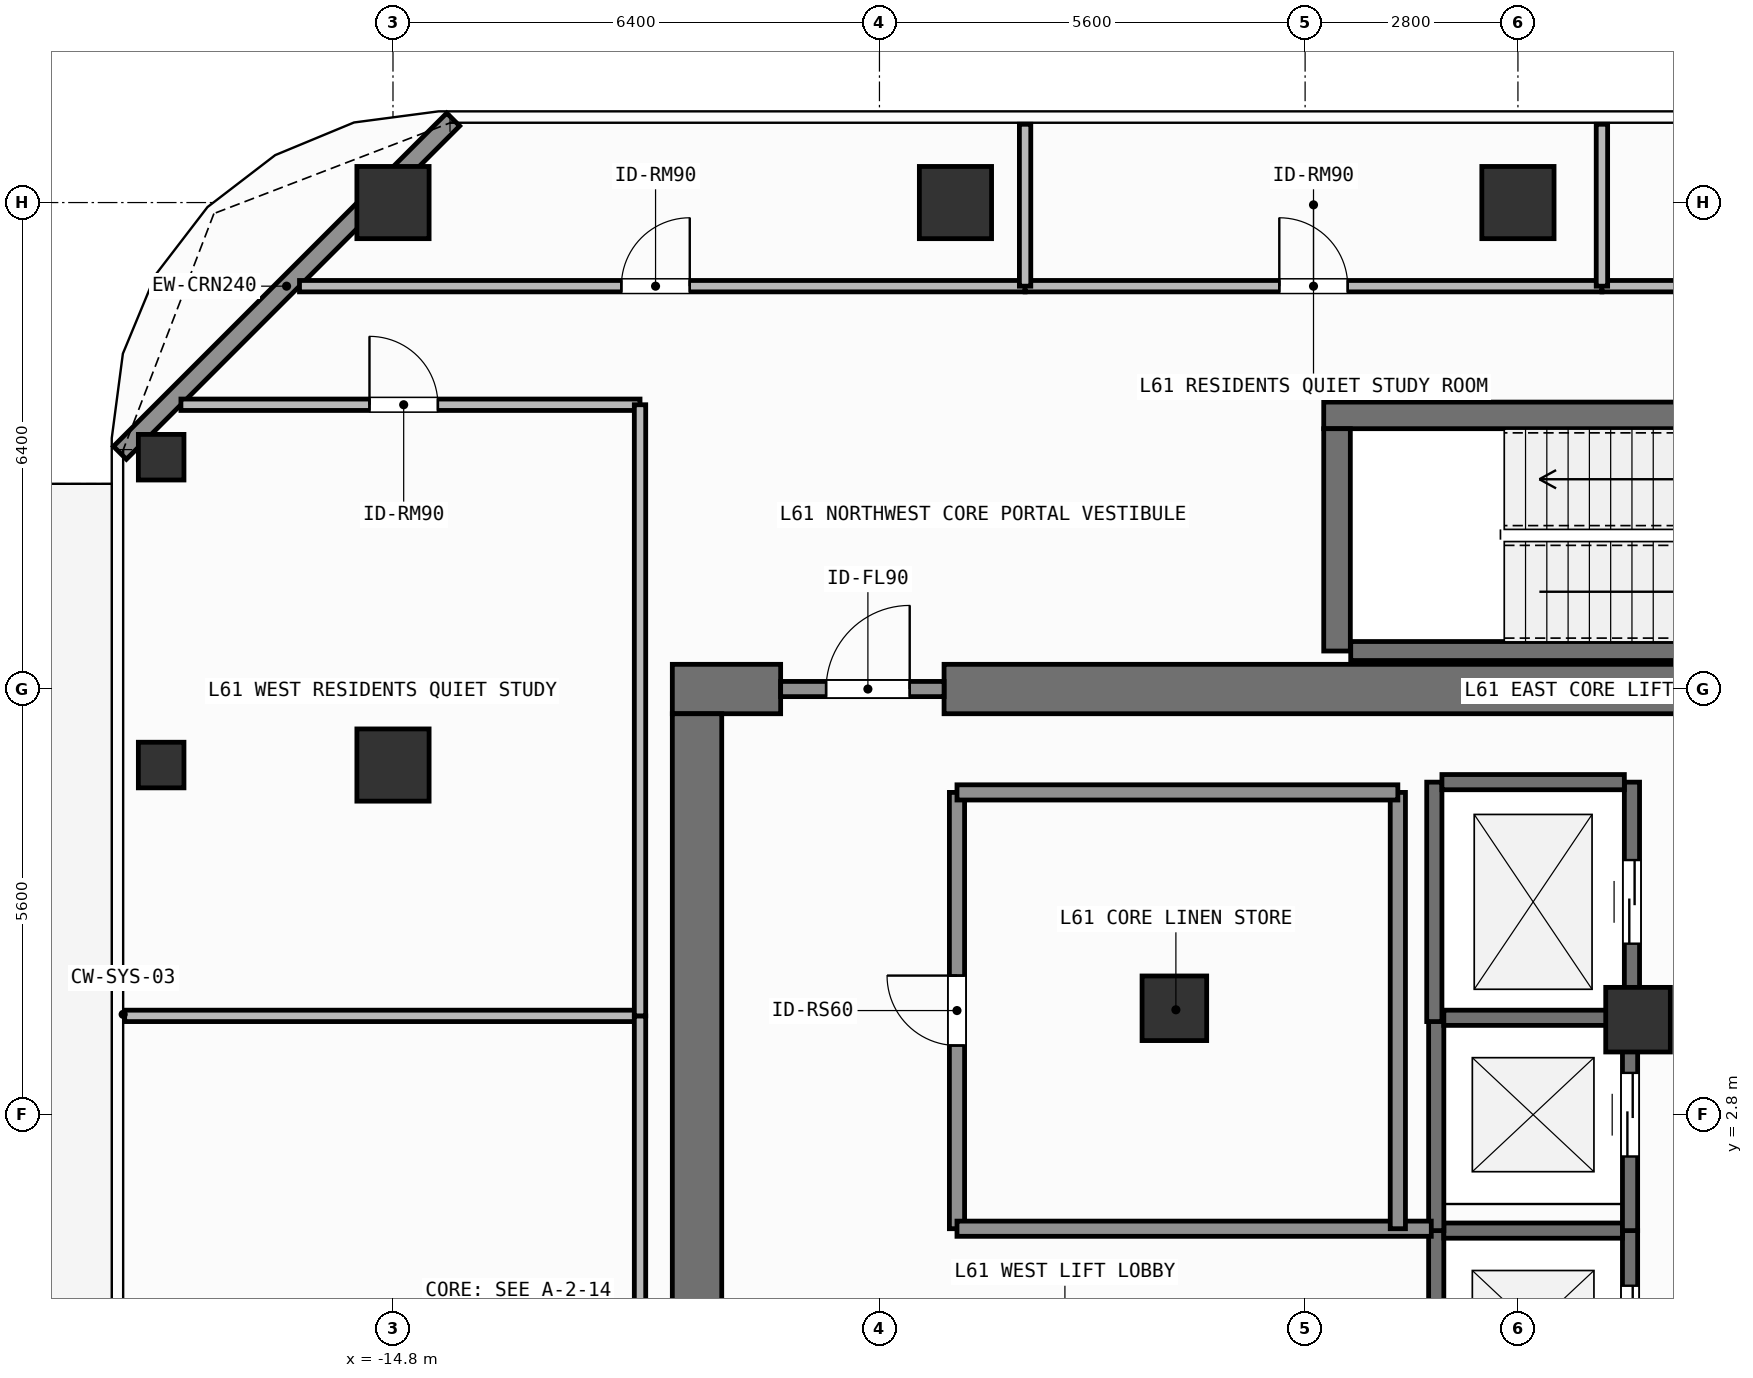
"""IFC4 building model, lengths in metres.
Left out: names, types, materials, properties, quantities, classifications, styles, units other than length and angle.
Written with IfcOpenShell. Run it as: python <this file> out.ifc"""

import sys

from ifc_helpers import new_model, si_unit, direction, frame, frame_2d, origin, origin_2d, place, context, subcontext, project, spatial, rectangle, hollow_rectangle, extrude, element, fill, save


model = new_model("IFC4")
c1 = context("Model", 3, precision=1e-05, world=origin(), true_north=direction((0.0, 1.0)))
c2 = subcontext(c1, "Body", "Model", "MODEL_VIEW")
j1 = project(units=[si_unit("LENGTHUNIT", "METRE"), si_unit("PLANEANGLEUNIT", "RADIAN")], contexts=[c1])
p1 = place(None, origin())
s1 = spatial("IfcSite", under=j1, at=p1, CompositionType="ELEMENT")
p2 = place(p1, origin())
s2 = spatial("IfcBuilding", under=s1, at=p2, CompositionType="ELEMENT")
p3 = place(p2, frame((0.0, 0.0, 250.8)))
s3 = spatial("IfcBuildingStorey", under=s2, at=p3, CompositionType="ELEMENT", Elevation=250.8)
p4 = place(p3, frame((-11.125, 8.4, 0.0), z_axis=(0.0, 0.0, 1.0), x_axis=(1.0, 0.0, 0.0)))
e1 = element("IfcWall", 1, at=p4, inside=s3, PredefinedType="SHEAR", context=c2, shape_type="SweptSolid", body=[
    extrude(rectangle(XDim=1.425, YDim=0.65, at=frame_2d((0.712, 0.0))), origin(), (0.0, 0.0, 1.0), 3.9),
])
p5 = place(p3, frame((-7.55, 8.4, 0.0), z_axis=(0.0, 0.0, 1.0), x_axis=(1.0, 0.0, 0.0)))
e2 = element("IfcWall", 2, at=p5, inside=s3, PredefinedType="SHEAR", context=c2, shape_type="SweptSolid", body=[
    extrude(rectangle(XDim=16.275, YDim=0.65, at=frame_2d((8.138, 0.0))), origin(), (0.0, 0.0, 1.0), 3.9),
])
p6 = place(p3, frame((-10.8, -8.075, 0.0), z_axis=(0.0, 0.0, 1.0), x_axis=(0.0, 1.0, 0.0)))
e3 = element("IfcWall", 3, at=p6, inside=s3, PredefinedType="SHEAR", context=c2, shape_type="SweptSolid", body=[
    extrude(rectangle(XDim=16.15, YDim=0.65, at=frame_2d((8.075, 0.0))), origin(), (0.0, 0.0, 1.0), 3.9),
])
p7 = place(p3, frame((-2.555, 12.0, 0.0), z_axis=(0.0, 0.0, 1.0), x_axis=(1.0, 0.0, 0.0)))
e4 = element("IfcWall", 4, at=p7, inside=s3, PredefinedType="SHEAR", context=c2, shape_type="SweptSolid", body=[
    extrude(rectangle(XDim=7.31, YDim=0.35, at=frame_2d((3.655, 0.0))), origin(), (0.0, 0.0, 1.0), 3.9),
])
p8 = place(p3, frame((-2.2, 8.9, 0.0), z_axis=(0.0, 0.0, 1.0), x_axis=(1.0, 0.0, 0.0)))
e5 = element("IfcWall", 5, at=p8, inside=s3, PredefinedType="SHEAR", context=c2, shape_type="SweptSolid", body=[
    extrude(rectangle(XDim=6.6, YDim=0.25, at=frame_2d((3.3, 0.0))), origin(), (0.0, 0.0, 1.0), 3.9),
])
p9 = place(p3, frame((-2.38, 8.9, 0.0), z_axis=(0.0, 0.0, 1.0), x_axis=(0.0, 1.0, 0.0)))
e6 = element("IfcWall", 6, at=p9, inside=s3, PredefinedType="SHEAR", context=c2, shape_type="SweptSolid", body=[
    extrude(rectangle(XDim=2.925, YDim=0.35, at=frame_2d((1.462, 0.0))), origin(), (0.0, 0.0, 1.0), 3.9),
])
for number, where, z_axis, x_axis in (
    (7, (-14.8, 14.8, 0.0), (0.0, 0.0, 1.0), (1.0, 0.0, 0.0)),
    (8, (-7.4, 14.8, 0.0), (0.0, 0.0, 1.0), (1.0, 0.0, 0.0)),
    (9, (0.0, 14.8, 0.0), (0.0, 0.0, 1.0), (1.0, 0.0, 0.0)),
    (10, (-14.8, 7.4, 0.0), (0.0, 0.0, 1.0), (1.0, 0.0, 0.0)),
):
    element("IfcColumn", number, at=place(p3, frame(where, z_axis=z_axis, x_axis=x_axis)), inside=s3, PredefinedType="COLUMN", context=c2, shape_type="SweptSolid", body=[
        extrude(rectangle(XDim=0.95, YDim=0.95, at=origin_2d()), origin(), (0.0, 0.0, 1.0), 3.9),
    ])
for number, where, z_axis, x_axis in (
    (11, (1.58, 4.05, 0.0), (0.0, 0.0, 1.0), (1.0, 0.0, 0.0)),
    (12, (-4.52, 4.2, 0.0), (0.0, 0.0, 1.0), (1.0, 0.0, 0.0)),
):
    element("IfcColumn", number, at=place(p3, frame(where, z_axis=z_axis, x_axis=x_axis)), inside=s3, PredefinedType="COLUMN", context=c2, shape_type="SweptSolid", body=[
        extrude(rectangle(XDim=0.85, YDim=0.85, at=origin_2d()), origin(), (0.0, 0.0, 1.0), 3.9),
    ])
for number, where, z_axis, x_axis in (
    (13, (-17.85, 11.45, 0.0), (0.0, 0.0, 1.0), (1.0, 0.0, 0.0)),
    (14, (-17.85, 7.4, 0.0), (0.0, 0.0, 1.0), (1.0, 0.0, 0.0)),
):
    element("IfcColumn", number, at=place(p3, frame(where, z_axis=z_axis, x_axis=x_axis)), inside=s3, PredefinedType="COLUMN", context=c2, shape_type="SweptSolid", body=[
        extrude(hollow_rectangle(XDim=0.6, YDim=0.6, WallThickness=0.028, at=origin_2d()), origin(), (0.0, 0.0, 1.0), 3.9),
    ])
p10 = place(p3, frame((-18.392, 11.508, 0.0), z_axis=(0.0, 0.0, 1.0), x_axis=(0.707106781187, 0.707106781187, 0.0)))
e15 = element("IfcWall", 15, at=p10, inside=s3, PredefinedType="SOLIDWALL", context=c2, shape_type="SweptSolid", body=[
    extrude(rectangle(XDim=6.201, YDim=0.24, at=frame_2d((3.101, 0.0))), origin(), (0.0, 0.0, 1.0), 3.62),
])
p11 = place(p3, frame((-1.075, -1.525, 0.0), z_axis=(0.0, 0.0, 1.0), x_axis=(0.0, 1.0, 0.0)))
e16 = element("IfcWall", 16, at=p11, inside=s3, PredefinedType="SHEAR", context=c2, shape_type="SweptSolid", body=[
    extrude(rectangle(XDim=2.8, YDim=0.2, at=frame_2d((1.4, 0.0))), origin(), (0.0, 0.0, 1.0), 3.62),
])
p12 = place(p3, frame((1.475, -1.525, 0.0), z_axis=(0.0, 0.0, 1.0), x_axis=(0.0, 1.0, 0.0)))
e17 = element("IfcWall", 17, at=p12, inside=s3, PredefinedType="SHEAR", context=c2, shape_type="SweptSolid", body=[
    extrude(rectangle(XDim=2.8, YDim=0.2, at=frame_2d((1.4, 0.0))), origin(), (0.0, 0.0, 1.0), 3.62),
])
p13 = place(p12, frame((0.975, 0.0, 0.0)))
e18 = element("IfcOpeningElement", 18, at=p13, cuts=e17, PredefinedType="OPENING", context=c2, shape_type="SweptSolid", body=[
    extrude(rectangle(XDim=1.1, YDim=2.2, at=frame_2d((0.55, 1.1))), frame((0.0, 0.11, 0.0), z_axis=(0.0, -1.0, 0.0), x_axis=(1.0, 0.0, 0.0)), (0.0, 0.0, 1.0), 0.22),
])
p14 = place(p3, frame((-0.975, 1.275, 0.0), z_axis=(0.0, 0.0, 1.0), x_axis=(1.0, 0.0, 0.0)))
e19 = element("IfcWall", 19, at=p14, inside=s3, PredefinedType="SHEAR", context=c2, shape_type="SweptSolid", body=[
    extrude(rectangle(XDim=2.35, YDim=0.2, at=frame_2d((1.175, 0.0))), origin(), (0.0, 0.0, 1.0), 3.62),
])
p15 = place(p3, frame((-1.075, 1.275, 0.0), z_axis=(0.0, 0.0, 1.0), x_axis=(0.0, 1.0, 0.0)))
e20 = element("IfcWall", 20, at=p15, inside=s3, PredefinedType="SHEAR", context=c2, shape_type="SweptSolid", body=[
    extrude(rectangle(XDim=2.8, YDim=0.2, at=frame_2d((1.4, 0.0))), origin(), (0.0, 0.0, 1.0), 3.62),
])
p16 = place(p3, frame((1.475, 1.275, 0.0), z_axis=(0.0, 0.0, 1.0), x_axis=(0.0, 1.0, 0.0)))
e21 = element("IfcWall", 21, at=p16, inside=s3, PredefinedType="SHEAR", context=c2, shape_type="SweptSolid", body=[
    extrude(rectangle(XDim=2.8, YDim=0.2, at=frame_2d((1.4, 0.0))), origin(), (0.0, 0.0, 1.0), 3.62),
])
p17 = place(p16, frame((0.975, 0.0, 0.0)))
e22 = element("IfcOpeningElement", 22, at=p17, cuts=e21, PredefinedType="OPENING", context=c2, shape_type="SweptSolid", body=[
    extrude(rectangle(XDim=1.1, YDim=2.2, at=frame_2d((0.55, 1.1))), frame((0.0, 0.11, 0.0), z_axis=(0.0, -1.0, 0.0), x_axis=(1.0, 0.0, 0.0)), (0.0, 0.0, 1.0), 0.22),
])
p18 = place(p3, frame((-0.975, 4.075, 0.0), z_axis=(0.0, 0.0, 1.0), x_axis=(1.0, 0.0, 0.0)))
e23 = element("IfcWall", 23, at=p18, inside=s3, PredefinedType="SHEAR", context=c2, shape_type="SweptSolid", body=[
    extrude(rectangle(XDim=2.35, YDim=0.2, at=frame_2d((1.175, 0.0))), origin(), (0.0, 0.0, 1.0), 3.62),
])
p19 = place(p3, frame((-1.1, 4.025, 0.0), z_axis=(0.0, 0.0, 1.0), x_axis=(0.0, 1.0, 0.0)))
e24 = element("IfcWall", 24, at=p19, inside=s3, PredefinedType="SHEAR", context=c2, shape_type="SweptSolid", body=[
    extrude(rectangle(XDim=3.15, YDim=0.2, at=frame_2d((1.575, 0.0))), origin(), (0.0, 0.0, 1.0), 3.62),
])
p20 = place(p3, frame((1.5, 4.025, 0.0), z_axis=(0.0, 0.0, 1.0), x_axis=(0.0, 1.0, 0.0)))
e25 = element("IfcWall", 25, at=p20, inside=s3, PredefinedType="SHEAR", context=c2, shape_type="SweptSolid", body=[
    extrude(rectangle(XDim=3.15, YDim=0.2, at=frame_2d((1.575, 0.0))), origin(), (0.0, 0.0, 1.0), 3.62),
])
p21 = place(p20, frame((1.025, 0.0, 0.0)))
e26 = element("IfcOpeningElement", 26, at=p21, cuts=e25, PredefinedType="OPENING", context=c2, shape_type="SweptSolid", body=[
    extrude(rectangle(XDim=1.1, YDim=2.2, at=frame_2d((0.55, 1.1))), frame((0.0, 0.11, 0.0), z_axis=(0.0, -1.0, 0.0), x_axis=(1.0, 0.0, 0.0)), (0.0, 0.0, 1.0), 0.22),
])
p22 = place(p3, frame((-1.0, 7.175, 0.0), z_axis=(0.0, 0.0, 1.0), x_axis=(1.0, 0.0, 0.0)))
e27 = element("IfcWall", 27, at=p22, inside=s3, PredefinedType="SHEAR", context=c2, shape_type="SweptSolid", body=[
    extrude(rectangle(XDim=2.4, YDim=0.2, at=frame_2d((1.2, 0.0))), origin(), (0.0, 0.0, 1.0), 3.62),
])
p23 = place(p3, frame((-9.7, 8.4, 0.0), z_axis=(0.0, 0.0, 1.0), x_axis=(1.0, 0.0, 0.0)))
e28 = element("IfcWall", 28, at=p23, inside=s3, PredefinedType="SOLIDWALL", context=c2, shape_type="SweptSolid", body=[
    extrude(rectangle(XDim=2.15, YDim=0.2, at=frame_2d((1.075, 0.0))), origin(), (0.0, 0.0, 1.0), 2.86),
])
p24 = place(p23, frame((0.598, 0.0, 0.0)))
e29 = element("IfcOpeningElement", 29, at=p24, cuts=e28, PredefinedType="OPENING", context=c2, shape_type="SweptSolid", body=[
    extrude(rectangle(XDim=1.1, YDim=2.15, at=frame_2d((0.55, 1.075))), frame((0.0, 0.11, 0.0), z_axis=(0.0, -1.0, 0.0), x_axis=(1.0, 0.0, 0.0)), (0.0, 0.0, 1.0), 0.22),
])
p25 = place(p3, frame((-7.38, 1.3, 0.0), z_axis=(0.0, 0.0, 1.0), x_axis=(0.0, 1.0, 0.0)))
e30 = element("IfcWall", 30, at=p25, inside=s3, PredefinedType="SOLIDWALL", context=c2, shape_type="SweptSolid", body=[
    extrude(rectangle(XDim=5.74, YDim=0.2, at=frame_2d((2.87, 0.0))), origin(), (0.0, 0.0, 1.0), 3.62),
])
p26 = place(p25, frame((2.41, 0.0, 0.0)))
e31 = element("IfcOpeningElement", 31, at=p26, cuts=e30, PredefinedType="OPENING", context=c2, shape_type="SweptSolid", body=[
    extrude(rectangle(XDim=0.92, YDim=2.1, at=frame_2d((0.46, 1.05))), frame((0.0, 0.11, 0.0), z_axis=(0.0, -1.0, 0.0), x_axis=(1.0, 0.0, 0.0)), (0.0, 0.0, 1.0), 0.22),
])
p27 = place(p3, frame((-16.03, 13.7, 0.0), z_axis=(0.0, 0.0, 1.0), x_axis=(1.0, 0.0, 0.0)))
e32 = element("IfcWall", 32, at=p27, inside=s3, PredefinedType="PARTITIONING", context=c2, shape_type="SweptSolid", body=[
    extrude(rectangle(XDim=9.546, YDim=0.15, at=frame_2d((4.773, 0.0))), origin(), (0.0, 0.0, 1.0), 3.62),
])
p28 = place(p27, frame((4.234, 0.0, 0.0)))
e33 = element("IfcOpeningElement", 33, at=p28, cuts=e32, PredefinedType="OPENING", context=c2, shape_type="SweptSolid", body=[
    extrude(rectangle(XDim=0.9, YDim=2.1, at=frame_2d((0.45, 1.05))), frame((0.0, 0.085, 0.0), z_axis=(0.0, -1.0, 0.0), x_axis=(1.0, 0.0, 0.0)), (0.0, 0.0, 1.0), 0.17),
])
p29 = place(p3, frame((-6.484, 13.7, 0.0), z_axis=(0.0, 0.0, 1.0), x_axis=(1.0, 0.0, 0.0)))
e34 = element("IfcWall", 34, at=p29, inside=s3, PredefinedType="PARTITIONING", context=c2, shape_type="SweptSolid", body=[
    extrude(rectangle(XDim=7.589, YDim=0.15, at=frame_2d((3.794, 0.0))), origin(), (0.0, 0.0, 1.0), 3.62),
])
p30 = place(p29, frame((3.344, 0.0, 0.0)))
e35 = element("IfcOpeningElement", 35, at=p30, cuts=e34, PredefinedType="OPENING", context=c2, shape_type="SweptSolid", body=[
    extrude(rectangle(XDim=0.9, YDim=2.1, at=frame_2d((0.45, 1.05))), frame((0.0, 0.085, 0.0), z_axis=(0.0, -1.0, 0.0), x_axis=(1.0, 0.0, 0.0)), (0.0, 0.0, 1.0), 0.17),
])
p31 = place(p3, frame((1.105, 13.7, 0.0), z_axis=(0.0, 0.0, 1.0), x_axis=(1.0, 0.0, 0.0)))
e36 = element("IfcWall", 36, at=p31, inside=s3, PredefinedType="PARTITIONING", context=c2, shape_type="SweptSolid", body=[
    extrude(rectangle(XDim=12.381, YDim=0.15, at=frame_2d((6.19, 0.0))), origin(), (0.0, 0.0, 1.0), 3.62),
])
p32 = place(p31, frame((4.766, 0.0, 0.0)))
e37 = element("IfcOpeningElement", 37, at=p32, cuts=e36, PredefinedType="OPENING", context=c2, shape_type="SweptSolid", body=[
    extrude(rectangle(XDim=0.9, YDim=2.1, at=frame_2d((0.45, 1.05))), frame((0.0, 0.085, 0.0), z_axis=(0.0, -1.0, 0.0), x_axis=(1.0, 0.0, 0.0)), (0.0, 0.0, 1.0), 0.17),
])
p33 = place(p3, frame((-17.59, 12.14, 0.0), z_axis=(0.0, 0.0, 1.0), x_axis=(1.0, 0.0, 0.0)))
e38 = element("IfcWall", 38, at=p33, inside=s3, PredefinedType="PARTITIONING", context=c2, shape_type="SweptSolid", body=[
    extrude(rectangle(XDim=6.04, YDim=0.15, at=frame_2d((3.02, 0.0))), origin(), (0.0, 0.0, 1.0), 3.62),
])
p34 = place(p33, frame((2.481, 0.0, 0.0)))
e39 = element("IfcOpeningElement", 39, at=p34, cuts=e38, PredefinedType="OPENING", context=c2, shape_type="SweptSolid", body=[
    extrude(rectangle(XDim=0.9, YDim=2.1, at=frame_2d((0.45, 1.05))), frame((0.0, 0.085, 0.0), z_axis=(0.0, -1.0, 0.0), x_axis=(1.0, 0.0, 0.0)), (0.0, 0.0, 1.0), 0.17),
])
p35 = place(p3, frame((-7.38, 1.3, 0.0), z_axis=(0.0, 0.0, 1.0), x_axis=(1.0, 0.0, 0.0)))
e40 = element("IfcWall", 40, at=p35, inside=s3, PredefinedType="SOLIDWALL", context=c2, shape_type="SweptSolid", body=[
    extrude(rectangle(XDim=6.24, YDim=0.2, at=frame_2d((3.12, 0.0))), origin(), (0.0, 0.0, 1.0), 3.62),
])
p36 = place(p3, frame((-1.58, 1.3, 0.0), z_axis=(0.0, 0.0, 1.0), x_axis=(0.0, 1.0, 0.0)))
e41 = element("IfcWall", 41, at=p36, inside=s3, PredefinedType="SOLIDWALL", context=c2, shape_type="SweptSolid", body=[
    extrude(rectangle(XDim=5.74, YDim=0.2, at=frame_2d((2.87, 0.0))), origin(), (0.0, 0.0, 1.0), 3.62),
])
p37 = place(p3, frame((-7.38, 7.04, 0.0), z_axis=(0.0, 0.0, 1.0), x_axis=(1.0, 0.0, 0.0)))
e42 = element("IfcWall", 42, at=p37, inside=s3, PredefinedType="SOLIDWALL", context=c2, shape_type="SweptSolid", body=[
    extrude(rectangle(XDim=5.8, YDim=0.2, at=frame_2d((2.9, 0.0))), origin(), (0.0, 0.0, 1.0), 3.62),
])
for number, where, z_axis, x_axis in (
    (43, (-6.484, 13.7, 0.0), (0.0, 0.0, 1.0), (0.0, 1.0, 0.0)),
    (44, (1.105, 13.7, 0.0), (0.0, 0.0, 1.0), (0.0, 1.0, 0.0)),
):
    element("IfcWall", number, at=place(p3, frame(where, z_axis=z_axis, x_axis=x_axis)), inside=s3, PredefinedType="PARTITIONING", context=c2, shape_type="SweptSolid", body=[
        extrude(rectangle(XDim=2.13, YDim=0.15, at=frame_2d((1.065, 0.0))), origin(), (0.0, 0.0, 1.0), 3.62),
    ])
p38 = place(p3, frame((-18.33, 4.1, 0.0), z_axis=(0.0, 0.0, 1.0), x_axis=(1.0, 0.0, 0.0)))
e45 = element("IfcWall", 45, at=p38, inside=s3, PredefinedType="PARTITIONING", context=c2, shape_type="SweptSolid", body=[
    extrude(rectangle(XDim=6.78, YDim=0.15, at=frame_2d((3.39, 0.0))), origin(), (0.0, 0.0, 1.0), 3.62),
])
p39 = place(p3, frame((-11.55, -12.14, 0.0), z_axis=(0.0, 0.0, 1.0), x_axis=(0.0, 1.0, 0.0)))
e46 = element("IfcWall", 46, at=p39, inside=s3, PredefinedType="PARTITIONING", context=c2, shape_type="SweptSolid", body=[
    extrude(rectangle(XDim=16.24, YDim=0.15, at=frame_2d((8.12, 0.0))), origin(), (0.0, 0.0, 1.0), 3.62),
])
p40 = place(p3, frame((-11.55, 4.1, 0.0), z_axis=(0.0, 0.0, 1.0), x_axis=(0.0, 1.0, 0.0)))
e47 = element("IfcWall", 47, at=p40, inside=s3, PredefinedType="PARTITIONING", context=c2, shape_type="SweptSolid", body=[
    extrude(rectangle(XDim=8.04, YDim=0.15, at=frame_2d((4.02, 0.0))), origin(), (0.0, 0.0, 1.0), 3.62),
])
p41 = place(p13, origin())
e48 = element("IfcDoor", 48, at=p41, inside=s3, OperationType="SLIDING_TO_LEFT", PredefinedType="DOOR", context=c2, shape_type="SweptSolid", body=[
    extrude(rectangle(XDim=1.1, YDim=2.2, at=frame_2d((0.55, 1.1))), frame((0.0, 0.025, 0.0), z_axis=(0.0, -1.0, 0.0), x_axis=(1.0, 0.0, 0.0)), (0.0, 0.0, 1.0), 0.05),
])
fill(e18, e48)
p42 = place(p17, origin())
e49 = element("IfcDoor", 49, at=p42, inside=s3, OperationType="SLIDING_TO_LEFT", PredefinedType="DOOR", context=c2, shape_type="SweptSolid", body=[
    extrude(rectangle(XDim=1.1, YDim=2.2, at=frame_2d((0.55, 1.1))), frame((0.0, 0.025, 0.0), z_axis=(0.0, -1.0, 0.0), x_axis=(1.0, 0.0, 0.0)), (0.0, 0.0, 1.0), 0.05),
])
fill(e22, e49)
p43 = place(p21, origin())
e50 = element("IfcDoor", 50, at=p43, inside=s3, OperationType="SLIDING_TO_LEFT", PredefinedType="DOOR", context=c2, shape_type="SweptSolid", body=[
    extrude(rectangle(XDim=1.1, YDim=2.2, at=frame_2d((0.55, 1.1))), frame((0.0, 0.025, 0.0), z_axis=(0.0, -1.0, 0.0), x_axis=(1.0, 0.0, 0.0)), (0.0, 0.0, 1.0), 0.05),
])
fill(e26, e50)
p44 = place(p24, origin())
e51 = element("IfcDoor", 51, at=p44, inside=s3, OperationType="SINGLE_SWING_RIGHT", PredefinedType="DOOR", context=c2, shape_type="SweptSolid", body=[
    extrude(rectangle(XDim=1.1, YDim=2.15, at=frame_2d((0.55, 1.075))), frame((0.0, 0.025, 0.0), z_axis=(0.0, -1.0, 0.0), x_axis=(1.0, 0.0, 0.0)), (0.0, 0.0, 1.0), 0.05),
])
fill(e29, e51)
p45 = place(p26, origin())
e52 = element("IfcDoor", 52, at=p45, inside=s3, OperationType="SINGLE_SWING_RIGHT", PredefinedType="DOOR", context=c2, shape_type="SweptSolid", body=[
    extrude(rectangle(XDim=0.92, YDim=2.1, at=frame_2d((0.46, 1.05))), frame((0.0, 0.025, 0.0), z_axis=(0.0, -1.0, 0.0), x_axis=(1.0, 0.0, 0.0)), (0.0, 0.0, 1.0), 0.05),
])
fill(e31, e52)
p46 = place(p28, origin())
e53 = element("IfcDoor", 53, at=p46, inside=s3, OperationType="SINGLE_SWING_RIGHT", PredefinedType="DOOR", context=c2, shape_type="SweptSolid", body=[
    extrude(rectangle(XDim=0.9, YDim=2.1, at=frame_2d((0.45, 1.05))), frame((0.0, 0.025, 0.0), z_axis=(0.0, -1.0, 0.0), x_axis=(1.0, 0.0, 0.0)), (0.0, 0.0, 1.0), 0.05),
])
fill(e33, e53)
p47 = place(p30, origin())
e54 = element("IfcDoor", 54, at=p47, inside=s3, OperationType="SINGLE_SWING_LEFT", PredefinedType="DOOR", context=c2, shape_type="SweptSolid", body=[
    extrude(rectangle(XDim=0.9, YDim=2.1, at=frame_2d((0.45, 1.05))), frame((0.0, 0.025, 0.0), z_axis=(0.0, -1.0, 0.0), x_axis=(1.0, 0.0, 0.0)), (0.0, 0.0, 1.0), 0.05),
])
fill(e35, e54)
p48 = place(p34, origin())
e55 = element("IfcDoor", 55, at=p48, inside=s3, OperationType="SINGLE_SWING_LEFT", PredefinedType="DOOR", context=c2, shape_type="SweptSolid", body=[
    extrude(rectangle(XDim=0.9, YDim=2.1, at=frame_2d((0.45, 1.05))), frame((0.0, 0.025, 0.0), z_axis=(0.0, -1.0, 0.0), x_axis=(1.0, 0.0, 0.0)), (0.0, 0.0, 1.0), 0.05),
])
fill(e39, e55)
save(model, sys.argv[1])
